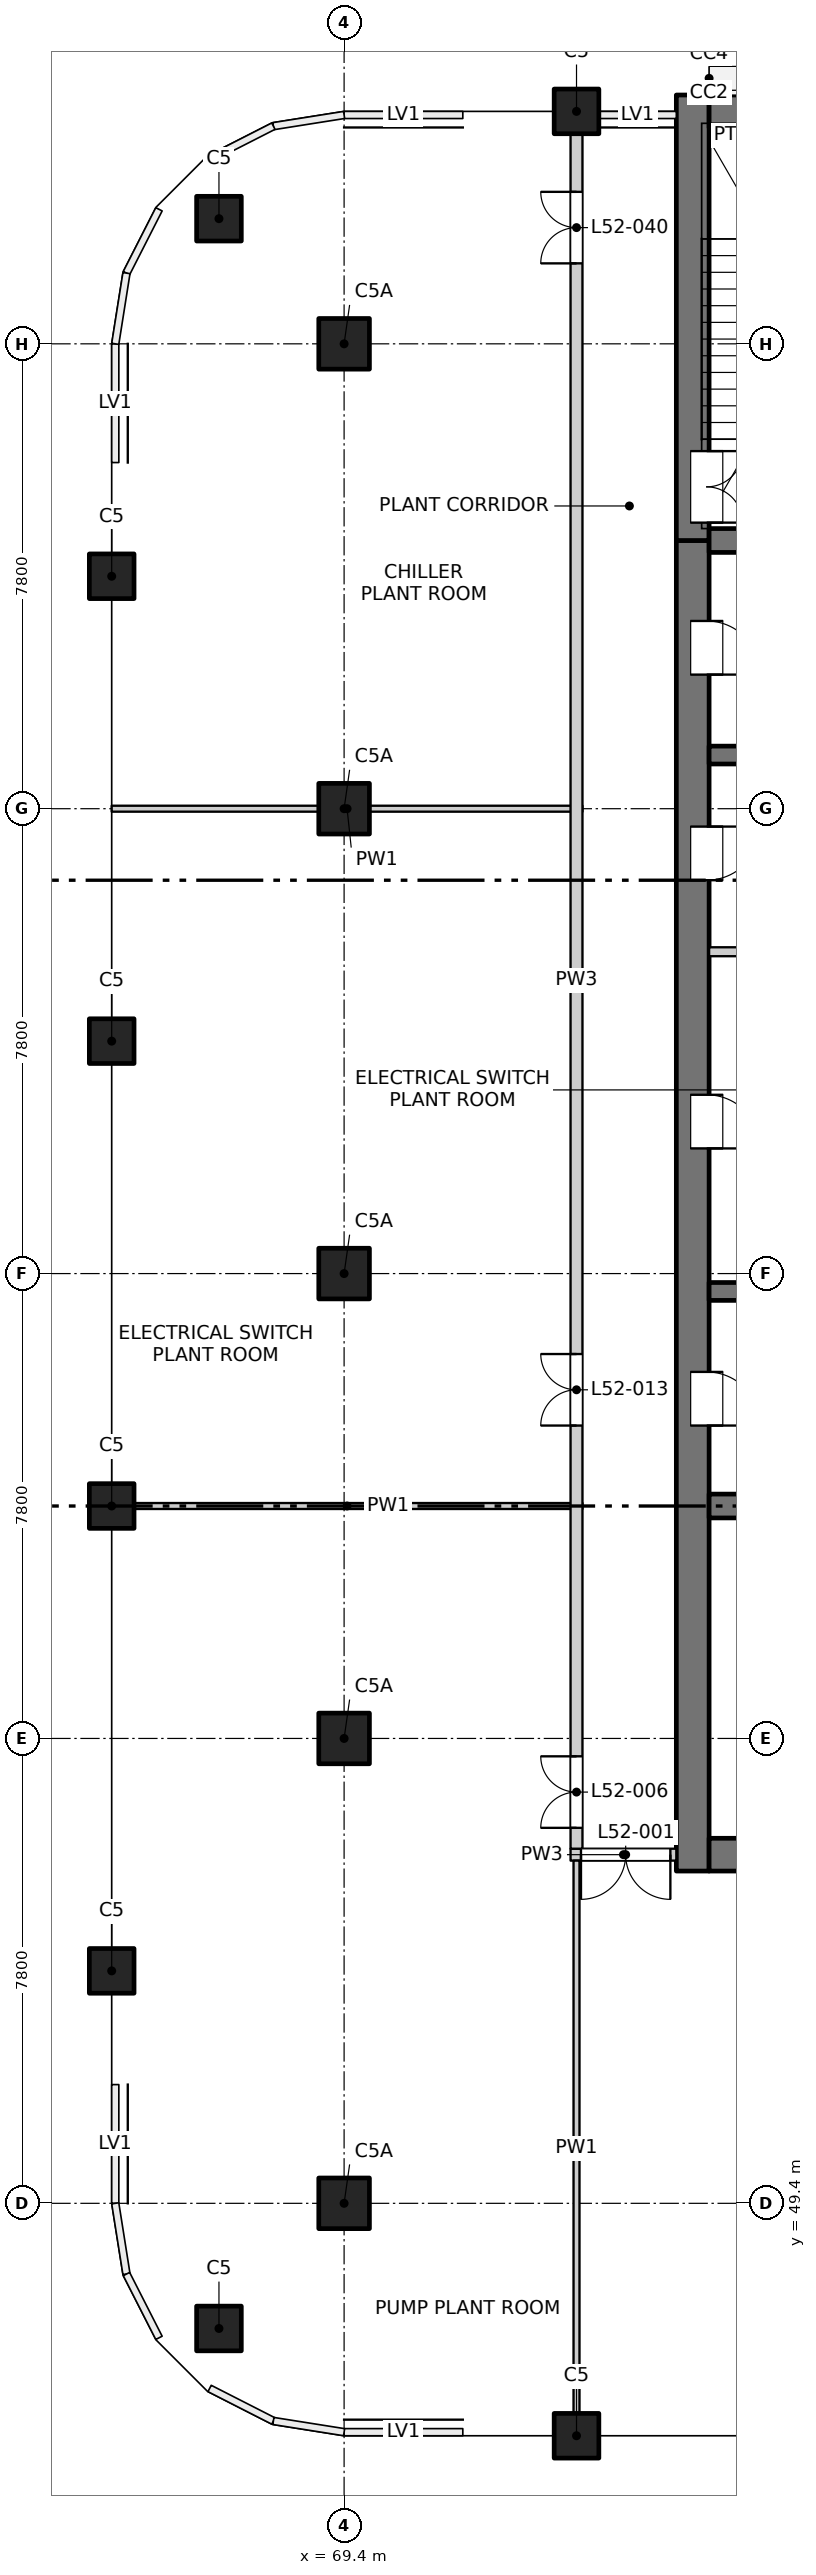
"""IFC4 building model, lengths in metres.
Left out: names, types, materials, properties, quantities, classifications, styles, units other than length and angle.
Written with IfcOpenShell. Run it as: python <this file> out.ifc"""

import sys

from ifc_helpers import new_model, si_unit, direction, frame, frame_2d, origin, origin_2d, place, context, subcontext, project, spatial, rectangle, extrude, element, fill, save


model = new_model("IFC4")
c1 = context("Model", 3, precision=1e-05, world=origin(), true_north=direction((0.0, 1.0)))
c2 = subcontext(c1, "Body", "Model", "MODEL_VIEW")
j1 = project(units=[si_unit("LENGTHUNIT", "METRE"), si_unit("PLANEANGLEUNIT", "RADIAN")], contexts=[c1])
p1 = place(None, origin())
s1 = spatial("IfcSite", under=j1, at=p1, CompositionType="ELEMENT")
p2 = place(p1, origin())
s2 = spatial("IfcBuilding", under=s1, at=p2, CompositionType="ELEMENT")
p3 = place(p2, frame((0.0, 0.0, 192.8)))
s3 = spatial("IfcBuildingStorey", under=s2, at=p3, CompositionType="ELEMENT", Elevation=192.8)
for number, where, z_axis, x_axis in (
    (1, (67.3, 47.3, -0.3), (0.0, 0.0, 1.0), (1.0, 0.0, 0.0)),
    (2, (67.3, 82.7, -0.3), (0.0, 0.0, 1.0), (1.0, 0.0, 0.0)),
    (3, (65.5, 53.3, -0.3), (0.0, 0.0, 1.0), (1.0, 0.0, 0.0)),
    (4, (73.3, 45.5, -0.3), (0.0, 0.0, 1.0), (1.0, 0.0, 0.0)),
    (5, (73.3, 84.5, -0.3), (0.0, 0.0, 1.0), (1.0, 0.0, 0.0)),
    (6, (65.5, 61.1, -0.3), (0.0, 0.0, 1.0), (1.0, 0.0, 0.0)),
    (7, (65.5, 68.9, -0.3), (0.0, 0.0, 1.0), (1.0, 0.0, 0.0)),
    (8, (65.5, 76.7, -0.3), (0.0, 0.0, 1.0), (1.0, 0.0, 0.0)),
):
    element("IfcColumn", number, at=place(p3, frame(where, z_axis=z_axis, x_axis=x_axis)), inside=s3, PredefinedType="COLUMN", context=c2, shape_type="SweptSolid", body=[
        extrude(rectangle(XDim=0.75, YDim=0.75, at=origin_2d()), origin(), (0.0, 0.0, 1.0), 4.5),
    ])
for number, where, z_axis, x_axis in (
    (9, (69.4, 49.4, -0.3), (0.0, 0.0, 1.0), (1.0, 0.0, 0.0)),
    (10, (69.4, 57.2, -0.3), (0.0, 0.0, 1.0), (1.0, 0.0, 0.0)),
    (11, (69.4, 65.0, -0.3), (0.0, 0.0, 1.0), (1.0, 0.0, 0.0)),
    (12, (69.4, 72.8, -0.3), (0.0, 0.0, 1.0), (1.0, 0.0, 0.0)),
    (13, (69.4, 80.6, -0.3), (0.0, 0.0, 1.0), (1.0, 0.0, 0.0)),
):
    element("IfcColumn", number, at=place(p3, frame(where, z_axis=z_axis, x_axis=x_axis)), inside=s3, PredefinedType="COLUMN", context=c2, shape_type="SweptSolid", body=[
        extrude(rectangle(XDim=0.85, YDim=0.85, at=origin_2d()), origin(), (0.0, 0.0, 1.0), 4.5),
    ])
p4 = place(p3, frame((75.25, 54.975, -0.3), z_axis=(0.0, 0.0, 1.0), x_axis=(0.0, 1.0, 0.0)))
e14 = element("IfcWall", 14, at=p4, inside=s3, PredefinedType="SOLIDWALL", context=c2, shape_type="SweptSolid", body=[
    extrude(rectangle(XDim=22.325, YDim=0.55, at=frame_2d((11.163, 0.0))), origin(), (0.0, 0.0, 1.0), 4.5),
])
p5 = place(p4, frame((7.475, 0.0, 0.3)))
e15 = element("IfcOpeningElement", 15, at=p5, cuts=e14, PredefinedType="OPENING", context=c2, shape_type="SweptSolid", body=[
    extrude(rectangle(XDim=0.9, YDim=2.1, at=frame_2d((0.45, 1.05))), frame((0.0, 0.285, 0.0), z_axis=(0.0, -1.0, 0.0), x_axis=(1.0, 0.0, 0.0)), (0.0, 0.0, 1.0), 0.57),
])
p6 = place(p4, frame((12.125, 0.0, 0.3)))
e16 = element("IfcOpeningElement", 16, at=p6, cuts=e14, PredefinedType="OPENING", context=c2, shape_type="SweptSolid", body=[
    extrude(rectangle(XDim=0.9, YDim=2.1, at=frame_2d((0.45, 1.05))), frame((0.0, 0.285, 0.0), z_axis=(0.0, -1.0, 0.0), x_axis=(1.0, 0.0, 0.0)), (0.0, 0.0, 1.0), 0.57),
])
p7 = place(p4, frame((16.625, 0.0, 0.3)))
e17 = element("IfcOpeningElement", 17, at=p7, cuts=e14, PredefinedType="OPENING", context=c2, shape_type="SweptSolid", body=[
    extrude(rectangle(XDim=0.9, YDim=2.1, at=frame_2d((0.45, 1.05))), frame((0.0, 0.285, 0.0), z_axis=(0.0, -1.0, 0.0), x_axis=(1.0, 0.0, 0.0)), (0.0, 0.0, 1.0), 0.57),
])
p8 = place(p4, frame((20.075, 0.0, 0.3)))
e18 = element("IfcOpeningElement", 18, at=p8, cuts=e14, PredefinedType="OPENING", context=c2, shape_type="SweptSolid", body=[
    extrude(rectangle(XDim=0.9, YDim=2.1, at=frame_2d((0.45, 1.05))), frame((0.0, 0.285, 0.0), z_axis=(0.0, -1.0, 0.0), x_axis=(1.0, 0.0, 0.0)), (0.0, 0.0, 1.0), 0.57),
])
p9 = place(p3, frame((75.25, 77.3, -0.3), z_axis=(0.0, 0.0, 1.0), x_axis=(0.0, 1.0, 0.0)))
e19 = element("IfcWall", 19, at=p9, inside=s3, PredefinedType="SOLIDWALL", context=c2, shape_type="SweptSolid", body=[
    extrude(rectangle(XDim=7.475, YDim=0.55, at=frame_2d((3.737, 0.0))), origin(), (0.0, 0.0, 1.0), 4.5),
])
p10 = place(p9, frame((0.3, 0.0, 0.3)))
e20 = element("IfcOpeningElement", 20, at=p10, cuts=e19, PredefinedType="OPENING", context=c2, shape_type="SweptSolid", body=[
    extrude(rectangle(XDim=1.2, YDim=2.1, at=frame_2d((0.6, 1.05))), frame((0.0, 0.285, 0.0), z_axis=(0.0, -1.0, 0.0), x_axis=(1.0, 0.0, 0.0)), (0.0, 0.0, 1.0), 0.57),
])
p11 = place(p3, frame((75.525, 55.25, -0.3), z_axis=(0.0, 0.0, 1.0), x_axis=(1.0, 0.0, 0.0)))
e21 = element("IfcWall", 21, at=p11, inside=s3, PredefinedType="SOLIDWALL", context=c2, shape_type="SweptSolid", body=[
    extrude(rectangle(XDim=18.95, YDim=0.55, at=frame_2d((9.475, 0.0))), origin(), (0.0, 0.0, 1.0), 4.5),
])
p12 = place(p11, frame((7.225, 0.0, 0.3)))
e22 = element("IfcOpeningElement", 22, at=p12, cuts=e21, PredefinedType="OPENING", context=c2, shape_type="SweptSolid", body=[
    extrude(rectangle(XDim=1.5, YDim=2.1, at=frame_2d((0.75, 1.05))), frame((0.0, 0.285, 0.0), z_axis=(0.0, -1.0, 0.0), x_axis=(1.0, 0.0, 0.0)), (0.0, 0.0, 1.0), 0.57),
])
p13 = place(p3, frame((75.525, 84.5, -0.3), z_axis=(0.0, 0.0, 1.0), x_axis=(1.0, 0.0, 0.0)))
e23 = element("IfcWall", 23, at=p13, inside=s3, PredefinedType="SOLIDWALL", context=c2, shape_type="SweptSolid", body=[
    extrude(rectangle(XDim=18.95, YDim=0.55, at=frame_2d((9.475, 0.0))), origin(), (0.0, 0.0, 1.0), 4.5),
])
p14 = place(p3, frame((75.525, 61.1, -0.3), z_axis=(0.0, 0.0, 1.0), x_axis=(1.0, 0.0, 0.0)))
e24 = element("IfcWall", 24, at=p14, inside=s3, PredefinedType="SOLIDWALL", context=c2, shape_type="SweptSolid", body=[
    extrude(rectangle(XDim=3.775, YDim=0.4, at=frame_2d((1.888, 0.0))), origin(), (0.0, 0.0, 1.0), 4.5),
])
for number, where, z_axis, x_axis in (
    (25, (75.525, 64.7, -0.3), (0.0, 0.0, 1.0), (1.0, 0.0, 0.0)),
    (26, (75.525, 73.7, -0.3), (0.0, 0.0, 1.0), (1.0, 0.0, 0.0)),
):
    element("IfcWall", number, at=place(p3, frame(where, z_axis=z_axis, x_axis=x_axis)), inside=s3, PredefinedType="SOLIDWALL", context=c2, shape_type="SweptSolid", body=[
        extrude(rectangle(XDim=3.775, YDim=0.3, at=frame_2d((1.888, 0.0))), origin(), (0.0, 0.0, 1.0), 4.5),
    ])
p15 = place(p3, frame((75.525, 77.3, -0.3), z_axis=(0.0, 0.0, 1.0), x_axis=(1.0, 0.0, 0.0)))
e27 = element("IfcWall", 27, at=p15, inside=s3, PredefinedType="SOLIDWALL", context=c2, shape_type="SweptSolid", body=[
    extrude(rectangle(XDim=3.775, YDim=0.4, at=frame_2d((1.888, 0.0))), origin(), (0.0, 0.0, 1.0), 4.5),
])
p16 = place(p3, frame((73.2, 55.25, 0.0), z_axis=(0.0, 0.0, 1.0), x_axis=(1.0, 0.0, 0.0)))
e28 = element("IfcWall", 28, at=p16, inside=s3, PredefinedType="PARTITIONING", context=c2, shape_type="SweptSolid", body=[
    extrude(rectangle(XDim=1.775, YDim=0.2, at=frame_2d((0.887, 0.0))), origin(), (0.0, 0.0, 1.0), 4.2),
])
p17 = place(p16, frame((0.175, 0.0, 0.0)))
e29 = element("IfcOpeningElement", 29, at=p17, cuts=e28, PredefinedType="OPENING", context=c2, shape_type="SweptSolid", body=[
    extrude(rectangle(XDim=1.5, YDim=2.1, at=frame_2d((0.75, 1.05))), frame((0.0, 0.11, 0.0), z_axis=(0.0, -1.0, 0.0), x_axis=(1.0, 0.0, 0.0)), (0.0, 0.0, 1.0), 0.22),
])
p18 = place(p3, frame((65.5, 61.1, 0.0), z_axis=(0.0, 0.0, 1.0), x_axis=(1.0, 0.0, 0.0)))
e30 = element("IfcWall", 30, at=p18, inside=s3, PredefinedType="PARTITIONING", context=c2, shape_type="SweptSolid", body=[
    extrude(rectangle(XDim=7.9, YDim=0.1, at=frame_2d((3.95, 0.0))), origin(), (0.0, 0.0, 1.0), 3.6),
])
p19 = place(p3, frame((75.525, 70.4, 0.0), z_axis=(0.0, 0.0, 1.0), x_axis=(1.0, 0.0, 0.0)))
e31 = element("IfcWall", 31, at=p19, inside=s3, PredefinedType="PARTITIONING", context=c2, shape_type="SweptSolid", body=[
    extrude(rectangle(XDim=3.775, YDim=0.15, at=frame_2d((1.887, 0.0))), origin(), (0.0, 0.0, 1.0), 4.2),
])
p20 = place(p3, frame((65.5, 72.8, 0.0), z_axis=(0.0, 0.0, 1.0), x_axis=(1.0, 0.0, 0.0)))
e32 = element("IfcWall", 32, at=p20, inside=s3, PredefinedType="PARTITIONING", context=c2, shape_type="SweptSolid", body=[
    extrude(rectangle(XDim=7.9, YDim=0.1, at=frame_2d((3.95, 0.0))), origin(), (0.0, 0.0, 1.0), 4.2),
])
p21 = place(p3, frame((73.3, 45.5, 0.0), z_axis=(0.0, 0.0, 1.0), x_axis=(0.0, 1.0, 0.0)))
e33 = element("IfcWall", 33, at=p21, inside=s3, PredefinedType="PARTITIONING", context=c2, shape_type="SweptSolid", body=[
    extrude(rectangle(XDim=9.65, YDim=0.1, at=frame_2d((4.825, 0.0))), origin(), (0.0, 0.0, 1.0), 4.2),
])
p22 = place(p3, frame((73.3, 55.35, 0.0), z_axis=(0.0, 0.0, 1.0), x_axis=(0.0, 1.0, 0.0)))
e34 = element("IfcWall", 34, at=p22, inside=s3, PredefinedType="PARTITIONING", context=c2, shape_type="SweptSolid", body=[
    extrude(rectangle(XDim=29.15, YDim=0.2, at=frame_2d((14.575, 0.0))), origin(), (0.0, 0.0, 1.0), 4.2),
])
p23 = place(p22, frame((0.35, 0.0, 0.0)))
e35 = element("IfcOpeningElement", 35, at=p23, cuts=e34, PredefinedType="OPENING", context=c2, shape_type="SweptSolid", body=[
    extrude(rectangle(XDim=1.2, YDim=2.1, at=frame_2d((0.6, 1.05))), frame((0.0, 0.11, 0.0), z_axis=(0.0, -1.0, 0.0), x_axis=(1.0, 0.0, 0.0)), (0.0, 0.0, 1.0), 0.22),
])
p24 = place(p22, frame((7.1, 0.0, 0.0)))
e36 = element("IfcOpeningElement", 36, at=p24, cuts=e34, PredefinedType="OPENING", context=c2, shape_type="SweptSolid", body=[
    extrude(rectangle(XDim=1.2, YDim=2.1, at=frame_2d((0.6, 1.05))), frame((0.0, 0.11, 0.0), z_axis=(0.0, -1.0, 0.0), x_axis=(1.0, 0.0, 0.0)), (0.0, 0.0, 1.0), 0.22),
])
p25 = place(p22, frame((26.6, 0.0, 0.0)))
e37 = element("IfcOpeningElement", 37, at=p25, cuts=e34, PredefinedType="OPENING", context=c2, shape_type="SweptSolid", body=[
    extrude(rectangle(XDim=1.2, YDim=2.1, at=frame_2d((0.6, 1.05))), frame((0.0, 0.11, 0.0), z_axis=(0.0, -1.0, 0.0), x_axis=(1.0, 0.0, 0.0)), (0.0, 0.0, 1.0), 0.22),
])
p26 = place(p17, origin())
e38 = element("IfcDoor", 38, at=p26, inside=s3, OperationType="DOUBLE_DOOR_SINGLE_SWING", PredefinedType="DOOR", context=c2, shape_type="SweptSolid", body=[
    extrude(rectangle(XDim=1.5, YDim=2.1, at=frame_2d((0.75, 1.05))), frame((0.0, 0.025, 0.0), z_axis=(0.0, -1.0, 0.0), x_axis=(1.0, 0.0, 0.0)), (0.0, 0.0, 1.0), 0.05),
])
fill(e29, e38)
p27 = place(p23, origin())
e39 = element("IfcDoor", 39, at=p27, inside=s3, OperationType="DOUBLE_DOOR_SINGLE_SWING", PredefinedType="DOOR", context=c2, shape_type="SweptSolid", body=[
    extrude(rectangle(XDim=1.2, YDim=2.1, at=frame_2d((0.6, 1.05))), frame((0.0, 0.025, 0.0), z_axis=(0.0, -1.0, 0.0), x_axis=(1.0, 0.0, 0.0)), (0.0, 0.0, 1.0), 0.05),
])
fill(e35, e39)
p28 = place(p5, origin())
e40 = element("IfcDoor", 40, at=p28, inside=s3, OperationType="SINGLE_SWING_RIGHT", PredefinedType="DOOR", context=c2, shape_type="SweptSolid", body=[
    extrude(rectangle(XDim=0.9, YDim=2.1, at=frame_2d((0.45, 1.05))), frame((0.0, -0.21, 0.0), z_axis=(0.0, -1.0, 0.0), x_axis=(1.0, 0.0, 0.0)), (0.0, 0.0, 1.0), 0.05),
])
fill(e15, e40)
p29 = place(p24, origin())
e41 = element("IfcDoor", 41, at=p29, inside=s3, OperationType="DOUBLE_DOOR_SINGLE_SWING", PredefinedType="DOOR", context=c2, shape_type="SweptSolid", body=[
    extrude(rectangle(XDim=1.2, YDim=2.1, at=frame_2d((0.6, 1.05))), frame((0.0, 0.025, 0.0), z_axis=(0.0, -1.0, 0.0), x_axis=(1.0, 0.0, 0.0)), (0.0, 0.0, 1.0), 0.05),
])
fill(e36, e41)
p30 = place(p6, origin())
e42 = element("IfcDoor", 42, at=p30, inside=s3, OperationType="SINGLE_SWING_RIGHT", PredefinedType="DOOR", context=c2, shape_type="SweptSolid", body=[
    extrude(rectangle(XDim=0.9, YDim=2.1, at=frame_2d((0.45, 1.05))), frame((0.0, -0.21, 0.0), z_axis=(0.0, -1.0, 0.0), x_axis=(1.0, 0.0, 0.0)), (0.0, 0.0, 1.0), 0.05),
])
fill(e16, e42)
p31 = place(p7, origin())
e43 = element("IfcDoor", 43, at=p31, inside=s3, OperationType="SINGLE_SWING_LEFT", PredefinedType="DOOR", context=c2, shape_type="SweptSolid", body=[
    extrude(rectangle(XDim=0.9, YDim=2.1, at=frame_2d((0.45, 1.05))), frame((0.0, -0.21, 0.0), z_axis=(0.0, -1.0, 0.0), x_axis=(1.0, 0.0, 0.0)), (0.0, 0.0, 1.0), 0.05),
])
fill(e17, e43)
p32 = place(p8, origin())
e44 = element("IfcDoor", 44, at=p32, inside=s3, OperationType="SINGLE_SWING_RIGHT", PredefinedType="DOOR", context=c2, shape_type="SweptSolid", body=[
    extrude(rectangle(XDim=0.9, YDim=2.1, at=frame_2d((0.45, 1.05))), frame((0.0, -0.21, 0.0), z_axis=(0.0, -1.0, 0.0), x_axis=(1.0, 0.0, 0.0)), (0.0, 0.0, 1.0), 0.05),
])
fill(e18, e44)
p33 = place(p10, origin())
e45 = element("IfcDoor", 45, at=p33, inside=s3, OperationType="DOUBLE_DOOR_SINGLE_SWING", PredefinedType="DOOR", context=c2, shape_type="SweptSolid", body=[
    extrude(rectangle(XDim=1.2, YDim=2.1, at=frame_2d((0.6, 1.05))), frame((0.0, -0.21, 0.0), z_axis=(0.0, -1.0, 0.0), x_axis=(1.0, 0.0, 0.0)), (0.0, 0.0, 1.0), 0.05),
])
fill(e20, e45)
p34 = place(p25, origin())
e46 = element("IfcDoor", 46, at=p34, inside=s3, OperationType="DOUBLE_DOOR_SINGLE_SWING", PredefinedType="DOOR", context=c2, shape_type="SweptSolid", body=[
    extrude(rectangle(XDim=1.2, YDim=2.1, at=frame_2d((0.6, 1.05))), frame((0.0, 0.025, 0.0), z_axis=(0.0, -1.0, 0.0), x_axis=(1.0, 0.0, 0.0)), (0.0, 0.0, 1.0), 0.05),
])
fill(e37, e46)
save(model, sys.argv[1])
